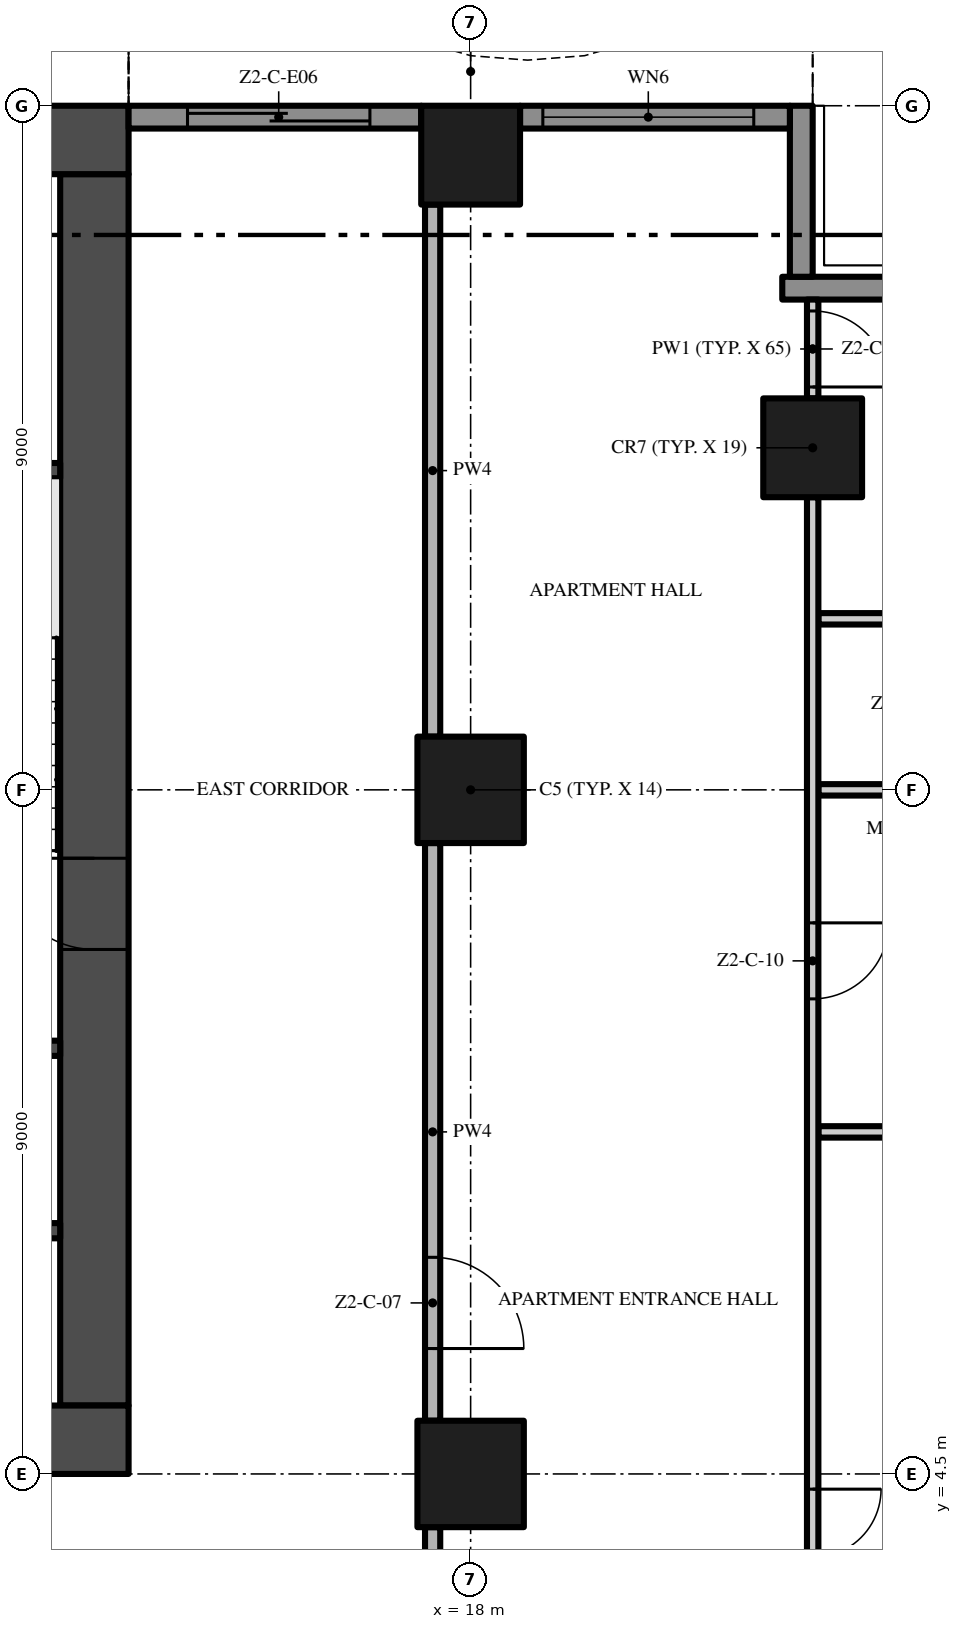
"""IFC4 building model, lengths in metres.
Left out: names, types, materials, properties, quantities, classifications, styles, units other than length and angle.
Written with IfcOpenShell. Run it as: python <this file> out.ifc"""

import sys

from ifc_helpers import new_model, si_unit, direction, frame, frame_2d, origin, origin_2d, place, context, subcontext, project, spatial, polyline, rectangle, outline, extrude, element, fill, save


model = new_model("IFC4")
c1 = context("Model", 3, precision=1e-05, world=origin(), true_north=direction((0.0, 1.0)))
c2 = subcontext(c1, "Body", "Model", "MODEL_VIEW")
j1 = project(units=[si_unit("LENGTHUNIT", "METRE"), si_unit("PLANEANGLEUNIT", "RADIAN")], contexts=[c1])
p1 = place(None, origin())
s1 = spatial("IfcSite", under=j1, at=p1, CompositionType="ELEMENT")
p2 = place(p1, origin())
s2 = spatial("IfcBuilding", under=s1, at=p2, CompositionType="ELEMENT")
p3 = place(p2, frame((0.0, 0.0, 92.2)))
s3 = spatial("IfcBuildingStorey", under=s2, at=p3, CompositionType="ELEMENT", Elevation=92.2)
p4 = place(p3, frame((-13.5, 4.95, -0.3), z_axis=(0.0, 0.0, 1.0), x_axis=(1.0, 0.0, 0.0)))
e1 = element("IfcWall", 1, at=p4, inside=s3, PredefinedType="SHEAR", context=c2, shape_type="SweptSolid", body=[
    extrude(rectangle(XDim=27.0, YDim=0.9, at=frame_2d((13.5, 0.0))), origin(), (0.0, 0.0, 1.0), 3.8),
])
p5 = place(p4, frame((12.0, 0.0, 0.3)))
e2 = element("IfcOpeningElement", 2, at=p5, cuts=e1, PredefinedType="OPENING", context=c2, shape_type="SweptSolid", body=[
    extrude(rectangle(XDim=3.0, YDim=2.4, at=frame_2d((1.5, 1.2))), frame((0.0, 0.46, 0.0), z_axis=(0.0, -1.0, 0.0), x_axis=(1.0, 0.0, 0.0)), (0.0, 0.0, 1.0), 0.92),
])
p6 = place(p4, frame((4.9, 0.0, 0.3)))
e3 = element("IfcOpeningElement", 3, at=p6, cuts=e1, PredefinedType="OPENING", context=c2, shape_type="SweptSolid", body=[
    extrude(rectangle(XDim=1.2, YDim=2.2, at=frame_2d((0.6, 1.1))), frame((0.0, 0.46, 0.0), z_axis=(0.0, -1.0, 0.0), x_axis=(1.0, 0.0, 0.0)), (0.0, 0.0, 1.0), 0.92),
])
p7 = place(p4, frame((20.75, 0.0, 0.3)))
e4 = element("IfcOpeningElement", 4, at=p7, cuts=e1, PredefinedType="OPENING", context=c2, shape_type="SweptSolid", body=[
    extrude(rectangle(XDim=1.5, YDim=2.2, at=frame_2d((0.75, 1.1))), frame((0.0, 0.46, 0.0), z_axis=(0.0, -1.0, 0.0), x_axis=(1.0, 0.0, 0.0)), (0.0, 0.0, 1.0), 0.92),
])
p8 = place(p4, frame((17.4, 0.0, 0.3)))
e5 = element("IfcOpeningElement", 5, at=p8, cuts=e1, PredefinedType="OPENING", context=c2, shape_type="SweptSolid", body=[
    extrude(rectangle(XDim=1.2, YDim=2.2, at=frame_2d((0.6, 1.1))), frame((0.0, 0.46, 0.0), z_axis=(0.0, -1.0, 0.0), x_axis=(1.0, 0.0, 0.0)), (0.0, 0.0, 1.0), 0.92),
])
p9 = place(p3, frame((13.05, 5.4, -0.3), z_axis=(0.0, 0.0, 1.0), x_axis=(0.0, 1.0, 0.0)))
e6 = element("IfcWall", 6, at=p9, inside=s3, PredefinedType="SHEAR", context=c2, shape_type="SweptSolid", body=[
    extrude(rectangle(XDim=16.2, YDim=0.9, at=frame_2d((8.1, 0.0))), origin(), (0.0, 0.0, 1.0), 3.8),
])
p10 = place(p9, frame((6.0, 0.0, 0.3)))
e7 = element("IfcOpeningElement", 7, at=p10, cuts=e6, PredefinedType="OPENING", context=c2, shape_type="SweptSolid", body=[
    extrude(rectangle(XDim=1.2, YDim=2.2, at=frame_2d((0.6, 1.1))), frame((0.0, 0.46, 0.0), z_axis=(0.0, -1.0, 0.0), x_axis=(1.0, 0.0, 0.0)), (0.0, 0.0, 1.0), 0.92),
])
p11 = place(p3, frame((13.5, 22.05, -0.3), z_axis=(0.0, 0.0, 1.0), x_axis=(-1.0, 0.0, 0.0)))
e8 = element("IfcWall", 8, at=p11, inside=s3, PredefinedType="SHEAR", context=c2, shape_type="SweptSolid", body=[
    extrude(rectangle(XDim=27.0, YDim=0.9, at=frame_2d((13.5, 0.0))), origin(), (0.0, 0.0, 1.0), 3.8),
])
p12 = place(p3, frame((18.0, 13.5, 0.0), z_axis=(0.0, 0.0, 1.0), x_axis=(1.0, 0.0, 0.0)))
e9 = element("IfcColumn", 9, at=p12, inside=s3, PredefinedType="COLUMN", context=c2, shape_type="SweptSolid", body=[
    extrude(rectangle(XDim=1.4, YDim=1.4, at=origin_2d()), origin(), (0.0, 0.0, 1.0), 3.5),
])
p13 = place(p3, frame((18.0, 21.85, 0.0), z_axis=(0.0, 0.0, 1.0), x_axis=(1.0, 0.0, 0.0)))
e10 = element("IfcColumn", 10, at=p13, inside=s3, PredefinedType="COLUMN", context=c2, shape_type="SweptSolid", body=[
    extrude(rectangle(XDim=1.3, YDim=1.3, at=origin_2d()), origin(), (0.0, 0.0, 1.0), 3.5),
])
p14 = place(p3, frame((18.0, 4.5, 0.0), z_axis=(0.0, 0.0, 1.0), x_axis=(1.0, 0.0, 0.0)))
e11 = element("IfcColumn", 11, at=p14, inside=s3, PredefinedType="COLUMN", context=c2, shape_type="SweptSolid", body=[
    extrude(rectangle(XDim=1.4, YDim=1.4, at=origin_2d()), origin(), (0.0, 0.0, 1.0), 3.5),
])
p15 = place(p3, frame((22.5, 18.0, 0.0), z_axis=(0.0, 0.0, 1.0), x_axis=(1.0, 0.0, 0.0)))
e12 = element("IfcColumn", 12, at=p15, inside=s3, PredefinedType="COLUMN", context=c2, shape_type="SweptSolid", body=[
    extrude(rectangle(XDim=1.3, YDim=1.3, at=origin_2d()), origin(), (0.0, 0.0, 1.0), 3.5),
])
p16 = place(p3, frame((22.1, 20.1, 0.0), z_axis=(0.0, 0.0, 1.0), x_axis=(1.0, 0.0, 0.0)))
e13 = element("IfcWall", 13, at=p16, inside=s3, PredefinedType="SOLIDWALL", context=c2, shape_type="SweptSolid", body=[
    extrude(rectangle(XDim=2.35, YDim=0.3, at=frame_2d((1.175, 0.0))), origin(), (0.0, 0.0, 1.0), 3.5),
])
p17 = place(p3, frame((22.35, 22.5, 0.0), z_axis=(0.0, 0.0, 1.0), x_axis=(0.0, -1.0, 0.0)))
e14 = element("IfcWall", 14, at=p17, inside=s3, PredefinedType="SOLIDWALL", context=c2, shape_type="SweptSolid", body=[
    extrude(rectangle(XDim=2.25, YDim=0.3, at=frame_2d((1.125, 0.0))), origin(), (0.0, 0.0, 1.0), 3.5),
])
p18 = place(p3, frame((18.65, 22.35, 0.0), z_axis=(0.0, 0.0, 1.0), x_axis=(1.0, 0.0, 0.0)))
e15 = element("IfcWall", 15, at=p18, inside=s3, PredefinedType="SOLIDWALL", context=c2, shape_type="SweptSolid", body=[
    extrude(rectangle(XDim=3.55, YDim=0.3, at=frame_2d((1.775, 0.0))), origin(), (0.0, 0.0, 1.0), 3.5),
])
p19 = place(p18, frame((0.3, 0.0, 0.45)))
e16 = element("IfcOpeningElement", 16, at=p19, cuts=e15, PredefinedType="OPENING", context=c2, shape_type="SweptSolid", body=[
    extrude(rectangle(XDim=2.775, YDim=2.65, at=frame_2d((1.387, 1.325))), frame((0.0, 0.16, 0.0), z_axis=(0.0, -1.0, 0.0), x_axis=(1.0, 0.0, 0.0)), (0.0, 0.0, 1.0), 0.32),
])
p20 = place(p3, frame((13.5, 22.35, 0.0), z_axis=(0.0, 0.0, 1.0), x_axis=(1.0, 0.0, 0.0)))
e17 = element("IfcWall", 17, at=p20, inside=s3, PredefinedType="SOLIDWALL", context=c2, shape_type="SweptSolid", body=[
    extrude(rectangle(XDim=3.85, YDim=0.3, at=frame_2d((1.925, 0.0))), origin(), (0.0, 0.0, 1.0), 3.5),
])
p21 = place(p20, frame((0.775, 0.0, 0.0)))
e18 = element("IfcOpeningElement", 18, at=p21, cuts=e17, PredefinedType="OPENING", context=c2, shape_type="SweptSolid", body=[
    extrude(rectangle(XDim=2.4, YDim=2.4, at=frame_2d((1.2, 1.2))), frame((0.0, 0.16, 0.0), z_axis=(0.0, -1.0, 0.0), x_axis=(1.0, 0.0, 0.0)), (0.0, 0.0, 1.0), 0.32),
])
p22 = place(p3, origin())
e19 = element("IfcWall", 19, at=p22, inside=s3, PredefinedType="USERDEFINED", context=c2, shape_type="SweptSolid", body=[
    extrude(outline(polyline([(22.5, 24.3), (21.0, 23.595), (19.5, 23.159), (18.75, 23.1), (18.0, 23.159), (16.5, 23.595), (15.0, 24.3), (13.5, 25.005), (13.394, 24.779), (14.894, 24.074), (16.411, 23.36), (17.955, 22.911), (18.75, 22.849), (19.545, 22.911), (21.089, 23.36), (22.606, 24.074), (22.5, 24.3)])), origin(), (0.0, 0.0, 1.0), 0.9),
])
for number, where, z_axis, x_axis in (
    (20, (9.65, 7.7, 0.0), (0.0, 0.0, 1.0), (1.0, 0.0, 0.0)),
    (21, (9.65, 10.1, 0.0), (0.0, 0.0, 1.0), (1.0, 0.0, 0.0)),
    (22, (9.65, 17.7, 0.0), (0.0, 0.0, 1.0), (1.0, 0.0, 0.0)),
):
    element("IfcWall", number, at=place(p3, frame(where, z_axis=z_axis, x_axis=x_axis)), inside=s3, PredefinedType="SHEAR", context=c2, shape_type="SweptSolid", body=[
        extrude(rectangle(XDim=2.95, YDim=0.2, at=frame_2d((1.475, 0.0))), origin(), (0.0, 0.0, 1.0), 3.5),
    ])
p23 = place(p3, frame((22.575, 9.0, 0.0), z_axis=(0.0, 0.0, 1.0), x_axis=(1.0, 0.0, 0.0)))
e23 = element("IfcWall", 23, at=p23, inside=s3, PredefinedType="PARTITIONING", context=c2, shape_type="SweptSolid", body=[
    extrude(rectangle(XDim=4.125, YDim=0.15, at=frame_2d((2.062, 0.0))), origin(), (0.0, 0.0, 1.0), 3.5),
])
p24 = place(p3, frame((22.575, 13.5, 0.0), z_axis=(0.0, 0.0, 1.0), x_axis=(1.0, 0.0, 0.0)))
e24 = element("IfcWall", 24, at=p24, inside=s3, PredefinedType="PARTITIONING", context=c2, shape_type="SweptSolid", body=[
    extrude(rectangle(XDim=3.125, YDim=0.15, at=frame_2d((1.562, 0.0))), origin(), (0.0, 0.0, 1.0), 3.5),
])
p25 = place(p3, frame((22.575, 15.75, 0.0), z_axis=(0.0, 0.0, 1.0), x_axis=(1.0, 0.0, 0.0)))
e25 = element("IfcWall", 25, at=p25, inside=s3, PredefinedType="PARTITIONING", context=c2, shape_type="SweptSolid", body=[
    extrude(rectangle(XDim=1.875, YDim=0.15, at=frame_2d((0.938, 0.0))), origin(), (0.0, 0.0, 1.0), 3.5),
])
p26 = place(p3, frame((17.5, -0.2, 0.0), z_axis=(0.0, 0.0, 1.0), x_axis=(0.0, 1.0, 0.0)))
e26 = element("IfcWall", 26, at=p26, inside=s3, PredefinedType="PARTITIONING", context=c2, shape_type="SweptSolid", body=[
    extrude(rectangle(XDim=4.0, YDim=0.2, at=frame_2d((2.0, 0.0))), origin(), (0.0, 0.0, 1.0), 3.5),
])
p27 = place(p3, frame((17.5, 12.8, 0.0), z_axis=(0.0, 0.0, 1.0), x_axis=(0.0, -1.0, 0.0)))
e27 = element("IfcWall", 27, at=p27, inside=s3, PredefinedType="PARTITIONING", context=c2, shape_type="SweptSolid", body=[
    extrude(rectangle(XDim=7.6, YDim=0.2, at=frame_2d((3.8, 0.0))), origin(), (0.0, 0.0, 1.0), 3.5),
])
p28 = place(p27, frame((5.45, 0.0, 0.0)))
e28 = element("IfcOpeningElement", 28, at=p28, cuts=e27, PredefinedType="OPENING", context=c2, shape_type="SweptSolid", body=[
    extrude(rectangle(XDim=1.2, YDim=2.4, at=frame_2d((0.6, 1.2))), frame((0.0, 0.11, 0.0), z_axis=(0.0, -1.0, 0.0), x_axis=(1.0, 0.0, 0.0)), (0.0, 0.0, 1.0), 0.22),
])
p29 = place(p3, frame((17.5, 14.2, 0.0), z_axis=(0.0, 0.0, 1.0), x_axis=(0.0, 1.0, 0.0)))
e29 = element("IfcWall", 29, at=p29, inside=s3, PredefinedType="PARTITIONING", context=c2, shape_type="SweptSolid", body=[
    extrude(rectangle(XDim=7.0, YDim=0.2, at=frame_2d((3.5, 0.0))), origin(), (0.0, 0.0, 1.0), 3.5),
])
p30 = place(p3, frame((22.5, 17.35, 0.0), z_axis=(0.0, 0.0, 1.0), x_axis=(0.0, -1.0, 0.0)))
e30 = element("IfcWall", 30, at=p30, inside=s3, PredefinedType="PARTITIONING", context=c2, shape_type="SweptSolid", body=[
    extrude(rectangle(XDim=17.25, YDim=0.15, at=frame_2d((8.625, 0.0))), origin(), (0.0, 0.0, 1.0), 3.5),
])
p31 = place(p30, frame((13.05, 0.0, 0.0)))
e31 = element("IfcOpeningElement", 31, at=p31, cuts=e30, PredefinedType="OPENING", context=c2, shape_type="SweptSolid", body=[
    extrude(rectangle(XDim=1.8, YDim=2.4, at=frame_2d((0.9, 1.2))), frame((0.0, 0.085, 0.0), z_axis=(0.0, -1.0, 0.0), x_axis=(1.0, 0.0, 0.0)), (0.0, 0.0, 1.0), 0.17),
])
p32 = place(p30, frame((5.6, 0.0, 0.0)))
e32 = element("IfcOpeningElement", 32, at=p32, cuts=e30, PredefinedType="OPENING", context=c2, shape_type="SweptSolid", body=[
    extrude(rectangle(XDim=1.0, YDim=2.4, at=frame_2d((0.5, 1.2))), frame((0.0, 0.085, 0.0), z_axis=(0.0, -1.0, 0.0), x_axis=(1.0, 0.0, 0.0)), (0.0, 0.0, 1.0), 0.17),
])
p33 = place(p3, frame((22.5, 19.95, 0.0), z_axis=(0.0, 0.0, 1.0), x_axis=(0.0, -1.0, 0.0)))
e33 = element("IfcWall", 33, at=p33, inside=s3, PredefinedType="PARTITIONING", context=c2, shape_type="SweptSolid", body=[
    extrude(rectangle(XDim=1.3, YDim=0.15, at=frame_2d((0.65, 0.0))), origin(), (0.0, 0.0, 1.0), 3.5),
])
p34 = place(p33, frame((0.15, 0.0, 0.0)))
e34 = element("IfcOpeningElement", 34, at=p34, cuts=e33, PredefinedType="OPENING", context=c2, shape_type="SweptSolid", body=[
    extrude(rectangle(XDim=1.0, YDim=2.4, at=frame_2d((0.5, 1.2))), frame((0.0, 0.085, 0.0), z_axis=(0.0, -1.0, 0.0), x_axis=(1.0, 0.0, 0.0)), (0.0, 0.0, 1.0), 0.17),
])
p35 = place(p19, origin())
e35 = element("IfcWindow", 35, at=p35, inside=s3, PartitioningType="SINGLE_PANEL", PredefinedType="WINDOW", context=c2, shape_type="SweptSolid", body=[
    extrude(rectangle(XDim=2.775, YDim=2.65, at=frame_2d((1.387, 1.325))), frame((0.0, 0.03, 0.0), z_axis=(0.0, -1.0, 0.0), x_axis=(1.0, 0.0, 0.0)), (0.0, 0.0, 1.0), 0.06),
])
fill(e16, e35)
p36 = place(p21, origin())
e36 = element("IfcDoor", 36, at=p36, inside=s3, OperationType="SINGLE_SWING_LEFT", PredefinedType="DOOR", context=c2, shape_type="SweptSolid", body=[
    extrude(rectangle(XDim=2.4, YDim=2.4, at=frame_2d((1.2, 1.2))), frame((0.0, 0.025, 0.0), z_axis=(0.0, -1.0, 0.0), x_axis=(1.0, 0.0, 0.0)), (0.0, 0.0, 1.0), 0.05),
])
fill(e18, e36)
p37 = place(p10, frame((1.2, 0.0, 0.0), z_axis=(0.0, 0.0, 1.0), x_axis=(-1.0, 0.0, 0.0)))
e37 = element("IfcDoor", 37, at=p37, inside=s3, OperationType="SINGLE_SWING_LEFT", PredefinedType="DOOR", context=c2, shape_type="SweptSolid", body=[
    extrude(rectangle(XDim=1.2, YDim=2.2, at=frame_2d((0.6, 1.1))), frame((0.0, 0.025, 0.0), z_axis=(0.0, -1.0, 0.0), x_axis=(1.0, 0.0, 0.0)), (0.0, 0.0, 1.0), 0.05),
])
fill(e7, e37)
p38 = place(p28, origin())
e38 = element("IfcDoor", 38, at=p38, inside=s3, OperationType="SINGLE_SWING_RIGHT", PredefinedType="DOOR", context=c2, shape_type="SweptSolid", body=[
    extrude(rectangle(XDim=1.2, YDim=2.4, at=frame_2d((0.6, 1.2))), frame((0.0, 0.025, 0.0), z_axis=(0.0, -1.0, 0.0), x_axis=(1.0, 0.0, 0.0)), (0.0, 0.0, 1.0), 0.05),
])
fill(e28, e38)
p39 = place(p31, origin())
e39 = element("IfcDoor", 39, at=p39, inside=s3, OperationType="DOUBLE_DOOR_SINGLE_SWING", PredefinedType="DOOR", context=c2, shape_type="SweptSolid", body=[
    extrude(rectangle(XDim=1.8, YDim=2.4, at=frame_2d((0.9, 1.2))), frame((0.0, 0.025, 0.0), z_axis=(0.0, -1.0, 0.0), x_axis=(1.0, 0.0, 0.0)), (0.0, 0.0, 1.0), 0.05),
])
fill(e31, e39)
p40 = place(p32, origin())
e40 = element("IfcDoor", 40, at=p40, inside=s3, OperationType="SINGLE_SWING_LEFT", PredefinedType="DOOR", context=c2, shape_type="SweptSolid", body=[
    extrude(rectangle(XDim=1.0, YDim=2.4, at=frame_2d((0.5, 1.2))), frame((0.0, 0.025, 0.0), z_axis=(0.0, -1.0, 0.0), x_axis=(1.0, 0.0, 0.0)), (0.0, 0.0, 1.0), 0.05),
])
fill(e32, e40)
p41 = place(p34, origin())
e41 = element("IfcDoor", 41, at=p41, inside=s3, OperationType="SINGLE_SWING_RIGHT", PredefinedType="DOOR", context=c2, shape_type="SweptSolid", body=[
    extrude(rectangle(XDim=1.0, YDim=2.4, at=frame_2d((0.5, 1.2))), frame((0.0, 0.025, 0.0), z_axis=(0.0, -1.0, 0.0), x_axis=(1.0, 0.0, 0.0)), (0.0, 0.0, 1.0), 0.05),
])
fill(e34, e41)
save(model, sys.argv[1])
